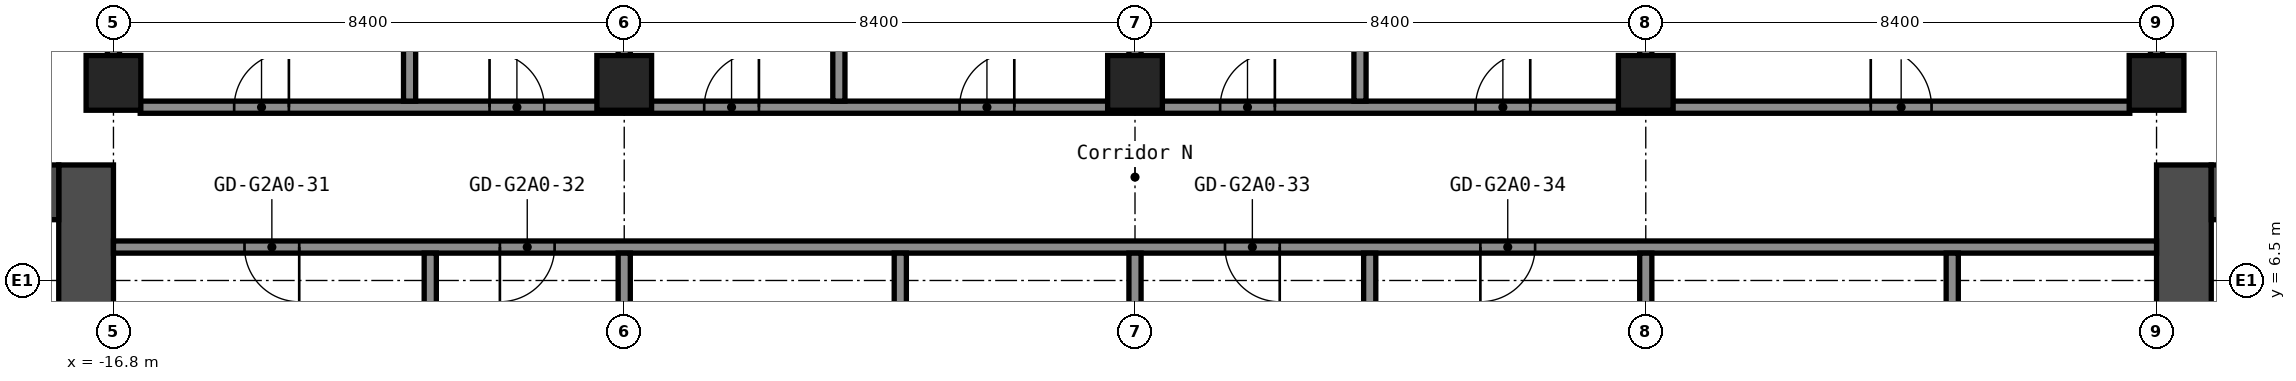
"""IFC4 building model, lengths in metres.
Left out: names, types, materials, properties, quantities, classifications, styles, units other than length and angle.
Written with IfcOpenShell. Run it as: python <this file> out.ifc"""

import sys

from ifc_helpers import new_model, si_unit, direction, frame, frame_2d, origin, origin_2d, place, context, subcontext, project, spatial, rectangle, hollow_rectangle, extrude, element, fill, save


model = new_model("IFC4")
c1 = context("Model", 3, precision=1e-05, world=origin(), true_north=direction((0.0, 1.0)))
c2 = subcontext(c1, "Body", "Model", "MODEL_VIEW")
j1 = project(units=[si_unit("LENGTHUNIT", "METRE"), si_unit("PLANEANGLEUNIT", "RADIAN")], contexts=[c1])
p1 = place(None, origin())
s1 = spatial("IfcSite", under=j1, at=p1, CompositionType="ELEMENT")
p2 = place(p1, origin())
s2 = spatial("IfcBuilding", under=s1, at=p2, CompositionType="ELEMENT")
p3 = place(p2, frame((0.0, 0.0, 75.4)))
s3 = spatial("IfcBuildingStorey", under=s2, at=p3, CompositionType="ELEMENT", Elevation=75.4)
for number, where, z_axis, x_axis in (
    (1, (-16.8, 9.75, 0.0), (0.0, 0.0, 1.0), (1.0, 0.0, 0.0)),
    (2, (-8.4, 9.75, 0.0), (0.0, 0.0, 1.0), (1.0, 0.0, 0.0)),
    (3, (0.0, 9.75, 0.0), (0.0, 0.0, 1.0), (1.0, 0.0, 0.0)),
    (4, (8.4, 9.75, 0.0), (0.0, 0.0, 1.0), (1.0, 0.0, 0.0)),
    (5, (16.8, 9.75, 0.0), (0.0, 0.0, 1.0), (1.0, 0.0, 0.0)),
):
    element("IfcColumn", number, at=place(p3, frame(where, z_axis=z_axis, x_axis=x_axis)), inside=s3, PredefinedType="COLUMN", context=c2, shape_type="SweptSolid", body=[
        extrude(hollow_rectangle(XDim=0.9, YDim=0.9, WallThickness=0.036, at=origin_2d()), origin(), (0.0, 0.0, 1.0), 2.8),
    ])
p4 = place(p3, frame((-17.25, -8.4, 0.0), z_axis=(0.0, 0.0, 1.0), x_axis=(0.0, 1.0, 0.0)))
e6 = element("IfcWall", 6, at=p4, inside=s3, PredefinedType="SHEAR", context=c2, shape_type="SweptSolid", body=[
    extrude(rectangle(XDim=16.8, YDim=0.9, at=frame_2d((8.4, 0.0))), origin(), (0.0, 0.0, 1.0), 2.8),
])
p5 = place(p4, frame((7.6, 0.0, 0.0)))
e7 = element("IfcOpeningElement", 7, at=p5, cuts=e6, PredefinedType="OPENING", context=c2, shape_type="SweptSolid", body=[
    extrude(rectangle(XDim=1.2, YDim=2.1, at=frame_2d((0.6, 1.05))), frame((0.0, 0.46, 0.0), z_axis=(0.0, -1.0, 0.0), x_axis=(1.0, 0.0, 0.0)), (0.0, 0.0, 1.0), 0.92),
])
p6 = place(p3, frame((-32.7, 7.95, 0.0), z_axis=(0.0, 0.0, 1.0), x_axis=(1.0, 0.0, 0.0)))
e8 = element("IfcWall", 8, at=p6, inside=s3, PredefinedType="SHEAR", context=c2, shape_type="SweptSolid", body=[
    extrude(rectangle(XDim=15.0, YDim=0.9, at=frame_2d((7.5, 0.0))), origin(), (0.0, 0.0, 1.0), 2.8),
])
p7 = place(p6, frame((3.4, 0.0, 0.0)))
e9 = element("IfcOpeningElement", 9, at=p7, cuts=e8, PredefinedType="OPENING", context=c2, shape_type="SweptSolid", body=[
    extrude(rectangle(XDim=1.2, YDim=2.1, at=frame_2d((0.6, 1.05))), frame((0.0, 0.46, 0.0), z_axis=(0.0, -1.0, 0.0), x_axis=(1.0, 0.0, 0.0)), (0.0, 0.0, 1.0), 0.92),
])
p8 = place(p6, frame((0.75, 0.0, 0.0)))
e10 = element("IfcOpeningElement", 10, at=p8, cuts=e8, PredefinedType="OPENING", context=c2, shape_type="SweptSolid", body=[
    extrude(rectangle(XDim=0.9, YDim=2.1, at=frame_2d((0.45, 1.05))), frame((0.0, 0.46, 0.0), z_axis=(0.0, -1.0, 0.0), x_axis=(1.0, 0.0, 0.0)), (0.0, 0.0, 1.0), 0.92),
])
p9 = place(p3, frame((17.25, -8.4, 0.0), z_axis=(0.0, 0.0, 1.0), x_axis=(0.0, 1.0, 0.0)))
e11 = element("IfcWall", 11, at=p9, inside=s3, PredefinedType="SHEAR", context=c2, shape_type="SweptSolid", body=[
    extrude(rectangle(XDim=16.8, YDim=0.9, at=frame_2d((8.4, 0.0))), origin(), (0.0, 0.0, 1.0), 2.8),
])
p10 = place(p9, frame((7.6, 0.0, 0.0)))
e12 = element("IfcOpeningElement", 12, at=p10, cuts=e11, PredefinedType="OPENING", context=c2, shape_type="SweptSolid", body=[
    extrude(rectangle(XDim=1.2, YDim=2.1, at=frame_2d((0.6, 1.05))), frame((0.0, 0.46, 0.0), z_axis=(0.0, -1.0, 0.0), x_axis=(1.0, 0.0, 0.0)), (0.0, 0.0, 1.0), 0.92),
])
p11 = place(p3, frame((17.7, 7.95, 0.0), z_axis=(0.0, 0.0, 1.0), x_axis=(1.0, 0.0, 0.0)))
e13 = element("IfcWall", 13, at=p11, inside=s3, PredefinedType="SHEAR", context=c2, shape_type="SweptSolid", body=[
    extrude(rectangle(XDim=15.0, YDim=0.9, at=frame_2d((7.5, 0.0))), origin(), (0.0, 0.0, 1.0), 2.8),
])
p12 = place(p11, frame((10.4, 0.0, 0.0)))
e14 = element("IfcOpeningElement", 14, at=p12, cuts=e13, PredefinedType="OPENING", context=c2, shape_type="SweptSolid", body=[
    extrude(rectangle(XDim=1.2, YDim=2.1, at=frame_2d((0.6, 1.05))), frame((0.0, 0.46, 0.0), z_axis=(0.0, -1.0, 0.0), x_axis=(1.0, 0.0, 0.0)), (0.0, 0.0, 1.0), 0.92),
])
p13 = place(p11, frame((13.35, 0.0, 0.0)))
e15 = element("IfcOpeningElement", 15, at=p13, cuts=e13, PredefinedType="OPENING", context=c2, shape_type="SweptSolid", body=[
    extrude(rectangle(XDim=0.9, YDim=2.1, at=frame_2d((0.45, 1.05))), frame((0.0, 0.46, 0.0), z_axis=(0.0, -1.0, 0.0), x_axis=(1.0, 0.0, 0.0)), (0.0, 0.0, 1.0), 0.92),
])
p14 = place(p3, frame((-16.8, 7.05, 0.0), z_axis=(0.0, 0.0, 1.0), x_axis=(1.0, 0.0, 0.0)))
e16 = element("IfcWall", 16, at=p14, inside=s3, PredefinedType="PARTITIONING", context=c2, shape_type="SweptSolid", body=[
    extrude(rectangle(XDim=33.6, YDim=0.2, at=frame_2d((16.8, 0.0))), origin(), (0.0, 0.0, 1.0), 2.8),
])
p15 = place(p14, frame((2.155, 0.0, 0.0)))
e17 = element("IfcOpeningElement", 17, at=p15, cuts=e16, PredefinedType="OPENING", context=c2, shape_type="SweptSolid", body=[
    extrude(rectangle(XDim=0.9, YDim=2.1, at=frame_2d((0.45, 1.05))), frame((0.0, 0.11, 0.0), z_axis=(0.0, -1.0, 0.0), x_axis=(1.0, 0.0, 0.0)), (0.0, 0.0, 1.0), 0.22),
])
p16 = place(p14, frame((6.355, 0.0, 0.0)))
e18 = element("IfcOpeningElement", 18, at=p16, cuts=e16, PredefinedType="OPENING", context=c2, shape_type="SweptSolid", body=[
    extrude(rectangle(XDim=0.9, YDim=2.1, at=frame_2d((0.45, 1.05))), frame((0.0, 0.11, 0.0), z_axis=(0.0, -1.0, 0.0), x_axis=(1.0, 0.0, 0.0)), (0.0, 0.0, 1.0), 0.22),
])
p17 = place(p14, frame((18.28, 0.0, 0.0)))
e19 = element("IfcOpeningElement", 19, at=p17, cuts=e16, PredefinedType="OPENING", context=c2, shape_type="SweptSolid", body=[
    extrude(rectangle(XDim=0.9, YDim=2.1, at=frame_2d((0.45, 1.05))), frame((0.0, 0.11, 0.0), z_axis=(0.0, -1.0, 0.0), x_axis=(1.0, 0.0, 0.0)), (0.0, 0.0, 1.0), 0.22),
])
p18 = place(p14, frame((22.48, 0.0, 0.0)))
e20 = element("IfcOpeningElement", 20, at=p18, cuts=e16, PredefinedType="OPENING", context=c2, shape_type="SweptSolid", body=[
    extrude(rectangle(XDim=0.9, YDim=2.1, at=frame_2d((0.45, 1.05))), frame((0.0, 0.11, 0.0), z_axis=(0.0, -1.0, 0.0), x_axis=(1.0, 0.0, 0.0)), (0.0, 0.0, 1.0), 0.22),
])
p19 = place(p3, frame((-16.36, 9.35, 0.0), z_axis=(0.0, 0.0, 1.0), x_axis=(1.0, 0.0, 0.0)))
e21 = element("IfcWall", 21, at=p19, inside=s3, PredefinedType="PARTITIONING", context=c2, shape_type="SweptSolid", body=[
    extrude(rectangle(XDim=32.72, YDim=0.2, at=frame_2d((16.36, 0.0))), origin(), (0.0, 0.0, 1.0), 2.8),
])
p20 = place(p19, frame((1.545, 0.0, 0.0)))
e22 = element("IfcOpeningElement", 22, at=p20, cuts=e21, PredefinedType="OPENING", context=c2, shape_type="SweptSolid", body=[
    extrude(rectangle(XDim=0.9, YDim=2.1, at=frame_2d((0.45, 1.05))), frame((0.0, 0.11, 0.0), z_axis=(0.0, -1.0, 0.0), x_axis=(1.0, 0.0, 0.0)), (0.0, 0.0, 1.0), 0.22),
])
p21 = place(p19, frame((5.745, 0.0, 0.0)))
e23 = element("IfcOpeningElement", 23, at=p21, cuts=e21, PredefinedType="OPENING", context=c2, shape_type="SweptSolid", body=[
    extrude(rectangle(XDim=0.9, YDim=2.1, at=frame_2d((0.45, 1.05))), frame((0.0, 0.11, 0.0), z_axis=(0.0, -1.0, 0.0), x_axis=(1.0, 0.0, 0.0)), (0.0, 0.0, 1.0), 0.22),
])
p22 = place(p19, frame((9.275, 0.0, 0.0)))
e24 = element("IfcOpeningElement", 24, at=p22, cuts=e21, PredefinedType="OPENING", context=c2, shape_type="SweptSolid", body=[
    extrude(rectangle(XDim=0.9, YDim=2.1, at=frame_2d((0.45, 1.05))), frame((0.0, 0.11, 0.0), z_axis=(0.0, -1.0, 0.0), x_axis=(1.0, 0.0, 0.0)), (0.0, 0.0, 1.0), 0.22),
])
p23 = place(p19, frame((13.475, 0.0, 0.0)))
e25 = element("IfcOpeningElement", 25, at=p23, cuts=e21, PredefinedType="OPENING", context=c2, shape_type="SweptSolid", body=[
    extrude(rectangle(XDim=0.9, YDim=2.1, at=frame_2d((0.45, 1.05))), frame((0.0, 0.11, 0.0), z_axis=(0.0, -1.0, 0.0), x_axis=(1.0, 0.0, 0.0)), (0.0, 0.0, 1.0), 0.22),
])
p24 = place(p19, frame((17.76, 0.0, 0.0)))
e26 = element("IfcOpeningElement", 26, at=p24, cuts=e21, PredefinedType="OPENING", context=c2, shape_type="SweptSolid", body=[
    extrude(rectangle(XDim=0.9, YDim=2.1, at=frame_2d((0.45, 1.05))), frame((0.0, 0.11, 0.0), z_axis=(0.0, -1.0, 0.0), x_axis=(1.0, 0.0, 0.0)), (0.0, 0.0, 1.0), 0.22),
])
p25 = place(p19, frame((21.96, 0.0, 0.0)))
e27 = element("IfcOpeningElement", 27, at=p25, cuts=e21, PredefinedType="OPENING", context=c2, shape_type="SweptSolid", body=[
    extrude(rectangle(XDim=0.9, YDim=2.1, at=frame_2d((0.45, 1.05))), frame((0.0, 0.11, 0.0), z_axis=(0.0, -1.0, 0.0), x_axis=(1.0, 0.0, 0.0)), (0.0, 0.0, 1.0), 0.22),
])
p26 = place(p19, frame((28.46, 0.0, 0.0)))
e28 = element("IfcOpeningElement", 28, at=p26, cuts=e21, PredefinedType="OPENING", context=c2, shape_type="SweptSolid", body=[
    extrude(rectangle(XDim=1.0, YDim=2.1, at=frame_2d((0.5, 1.05))), frame((0.0, 0.11, 0.0), z_axis=(0.0, -1.0, 0.0), x_axis=(1.0, 0.0, 0.0)), (0.0, 0.0, 1.0), 0.22),
])
p27 = place(p3, frame((-16.8, 10.19, 0.0), z_axis=(0.0, 0.0, 1.0), x_axis=(0.0, 1.0, 0.0)))
e29 = element("IfcWall", 29, at=p27, inside=s3, PredefinedType="PARTITIONING", context=c2, shape_type="SweptSolid", body=[
    extrude(rectangle(XDim=13.36, YDim=0.2, at=frame_2d((6.68, 0.0))), origin(), (0.0, 0.0, 1.0), 2.8),
])
p28 = place(p3, frame((-11.93, 9.45, 0.0), z_axis=(0.0, 0.0, 1.0), x_axis=(0.0, 1.0, 0.0)))
e30 = element("IfcWall", 30, at=p28, inside=s3, PredefinedType="PARTITIONING", context=c2, shape_type="SweptSolid", body=[
    extrude(rectangle(XDim=14.1, YDim=0.2, at=frame_2d((7.05, 0.0))), origin(), (0.0, 0.0, 1.0), 2.8),
])
for number, where, z_axis, x_axis in (
    (31, (-11.59, 1.05, 0.0), (0.0, 0.0, 1.0), (0.0, 1.0, 0.0)),
    (32, (-8.4, 1.05, 0.0), (0.0, 0.0, 1.0), (0.0, 1.0, 0.0)),
):
    element("IfcWall", number, at=place(p3, frame(where, z_axis=z_axis, x_axis=x_axis)), inside=s3, PredefinedType="PARTITIONING", context=c2, shape_type="SweptSolid", body=[
        extrude(rectangle(XDim=5.9, YDim=0.2, at=frame_2d((2.95, 0.0))), origin(), (0.0, 0.0, 1.0), 2.8),
    ])
p29 = place(p3, frame((-8.4, 10.19, 0.0), z_axis=(0.0, 0.0, 1.0), x_axis=(0.0, 1.0, 0.0)))
e33 = element("IfcWall", 33, at=p29, inside=s3, PredefinedType="PARTITIONING", context=c2, shape_type="SweptSolid", body=[
    extrude(rectangle(XDim=13.36, YDim=0.2, at=frame_2d((6.68, 0.0))), origin(), (0.0, 0.0, 1.0), 2.8),
])
p30 = place(p3, frame((-4.87, 9.45, 0.0), z_axis=(0.0, 0.0, 1.0), x_axis=(0.0, 1.0, 0.0)))
e34 = element("IfcWall", 34, at=p30, inside=s3, PredefinedType="PARTITIONING", context=c2, shape_type="SweptSolid", body=[
    extrude(rectangle(XDim=14.1, YDim=0.2, at=frame_2d((7.05, 0.0))), origin(), (0.0, 0.0, 1.0), 2.8),
])
for number, where, z_axis, x_axis in (
    (35, (-3.86, 1.05, 0.0), (0.0, 0.0, 1.0), (0.0, 1.0, 0.0)),
    (36, (0.0, 1.05, 0.0), (0.0, 0.0, 1.0), (0.0, 1.0, 0.0)),
):
    element("IfcWall", number, at=place(p3, frame(where, z_axis=z_axis, x_axis=x_axis)), inside=s3, PredefinedType="PARTITIONING", context=c2, shape_type="SweptSolid", body=[
        extrude(rectangle(XDim=5.9, YDim=0.2, at=frame_2d((2.95, 0.0))), origin(), (0.0, 0.0, 1.0), 2.8),
    ])
p31 = place(p3, frame((0.0, 10.19, 0.0), z_axis=(0.0, 0.0, 1.0), x_axis=(0.0, 1.0, 0.0)))
e37 = element("IfcWall", 37, at=p31, inside=s3, PredefinedType="PARTITIONING", context=c2, shape_type="SweptSolid", body=[
    extrude(rectangle(XDim=13.36, YDim=0.2, at=frame_2d((6.68, 0.0))), origin(), (0.0, 0.0, 1.0), 2.8),
])
p32 = place(p3, frame((3.7, 9.45, 0.0), z_axis=(0.0, 0.0, 1.0), x_axis=(0.0, 1.0, 0.0)))
e38 = element("IfcWall", 38, at=p32, inside=s3, PredefinedType="PARTITIONING", context=c2, shape_type="SweptSolid", body=[
    extrude(rectangle(XDim=14.1, YDim=0.2, at=frame_2d((7.05, 0.0))), origin(), (0.0, 0.0, 1.0), 2.8),
])
for number, where, z_axis, x_axis in (
    (39, (3.86, 1.05, 0.0), (0.0, 0.0, 1.0), (0.0, 1.0, 0.0)),
    (40, (8.4, 1.05, 0.0), (0.0, 0.0, 1.0), (0.0, 1.0, 0.0)),
):
    element("IfcWall", number, at=place(p3, frame(where, z_axis=z_axis, x_axis=x_axis)), inside=s3, PredefinedType="PARTITIONING", context=c2, shape_type="SweptSolid", body=[
        extrude(rectangle(XDim=5.9, YDim=0.2, at=frame_2d((2.95, 0.0))), origin(), (0.0, 0.0, 1.0), 2.8),
    ])
p33 = place(p3, frame((8.4, 10.19, 0.0), z_axis=(0.0, 0.0, 1.0), x_axis=(0.0, 1.0, 0.0)))
e41 = element("IfcWall", 41, at=p33, inside=s3, PredefinedType="PARTITIONING", context=c2, shape_type="SweptSolid", body=[
    extrude(rectangle(XDim=13.36, YDim=0.2, at=frame_2d((6.68, 0.0))), origin(), (0.0, 0.0, 1.0), 2.8),
])
p34 = place(p3, frame((13.44, 1.05, 0.0), z_axis=(0.0, 0.0, 1.0), x_axis=(0.0, 1.0, 0.0)))
e42 = element("IfcWall", 42, at=p34, inside=s3, PredefinedType="PARTITIONING", context=c2, shape_type="SweptSolid", body=[
    extrude(rectangle(XDim=5.9, YDim=0.2, at=frame_2d((2.95, 0.0))), origin(), (0.0, 0.0, 1.0), 2.8),
])
p35 = place(p3, frame((16.8, 10.19, 0.0), z_axis=(0.0, 0.0, 1.0), x_axis=(0.0, 1.0, 0.0)))
e43 = element("IfcWall", 43, at=p35, inside=s3, PredefinedType="PARTITIONING", context=c2, shape_type="SweptSolid", body=[
    extrude(rectangle(XDim=13.36, YDim=0.2, at=frame_2d((6.68, 0.0))), origin(), (0.0, 0.0, 1.0), 2.8),
])
p36 = place(p15, origin())
e44 = element("IfcDoor", 44, at=p36, inside=s3, OperationType="SINGLE_SWING_RIGHT", PredefinedType="DOOR", context=c2, shape_type="SweptSolid", body=[
    extrude(rectangle(XDim=0.9, YDim=2.1, at=frame_2d((0.45, 1.05))), frame((0.0, 0.025, 0.0), z_axis=(0.0, -1.0, 0.0), x_axis=(1.0, 0.0, 0.0)), (0.0, 0.0, 1.0), 0.05),
])
fill(e17, e44)
p37 = place(p16, origin())
e45 = element("IfcDoor", 45, at=p37, inside=s3, OperationType="SINGLE_SWING_LEFT", PredefinedType="DOOR", context=c2, shape_type="SweptSolid", body=[
    extrude(rectangle(XDim=0.9, YDim=2.1, at=frame_2d((0.45, 1.05))), frame((0.0, 0.025, 0.0), z_axis=(0.0, -1.0, 0.0), x_axis=(1.0, 0.0, 0.0)), (0.0, 0.0, 1.0), 0.05),
])
fill(e18, e45)
p38 = place(p17, origin())
e46 = element("IfcDoor", 46, at=p38, inside=s3, OperationType="SINGLE_SWING_RIGHT", PredefinedType="DOOR", context=c2, shape_type="SweptSolid", body=[
    extrude(rectangle(XDim=0.9, YDim=2.1, at=frame_2d((0.45, 1.05))), frame((0.0, 0.025, 0.0), z_axis=(0.0, -1.0, 0.0), x_axis=(1.0, 0.0, 0.0)), (0.0, 0.0, 1.0), 0.05),
])
fill(e19, e46)
p39 = place(p18, origin())
e47 = element("IfcDoor", 47, at=p39, inside=s3, OperationType="SINGLE_SWING_LEFT", PredefinedType="DOOR", context=c2, shape_type="SweptSolid", body=[
    extrude(rectangle(XDim=0.9, YDim=2.1, at=frame_2d((0.45, 1.05))), frame((0.0, 0.025, 0.0), z_axis=(0.0, -1.0, 0.0), x_axis=(1.0, 0.0, 0.0)), (0.0, 0.0, 1.0), 0.05),
])
fill(e20, e47)
p40 = place(p20, origin())
e48 = element("IfcDoor", 48, at=p40, inside=s3, OperationType="SINGLE_SWING_LEFT", PredefinedType="DOOR", context=c2, shape_type="SweptSolid", body=[
    extrude(rectangle(XDim=0.9, YDim=2.1, at=frame_2d((0.45, 1.05))), frame((0.0, 0.025, 0.0), z_axis=(0.0, -1.0, 0.0), x_axis=(1.0, 0.0, 0.0)), (0.0, 0.0, 1.0), 0.05),
])
fill(e22, e48)
p41 = place(p21, origin())
e49 = element("IfcDoor", 49, at=p41, inside=s3, OperationType="SINGLE_SWING_RIGHT", PredefinedType="DOOR", context=c2, shape_type="SweptSolid", body=[
    extrude(rectangle(XDim=0.9, YDim=2.1, at=frame_2d((0.45, 1.05))), frame((0.0, 0.025, 0.0), z_axis=(0.0, -1.0, 0.0), x_axis=(1.0, 0.0, 0.0)), (0.0, 0.0, 1.0), 0.05),
])
fill(e23, e49)
p42 = place(p22, origin())
e50 = element("IfcDoor", 50, at=p42, inside=s3, OperationType="SINGLE_SWING_LEFT", PredefinedType="DOOR", context=c2, shape_type="SweptSolid", body=[
    extrude(rectangle(XDim=0.9, YDim=2.1, at=frame_2d((0.45, 1.05))), frame((0.0, 0.025, 0.0), z_axis=(0.0, -1.0, 0.0), x_axis=(1.0, 0.0, 0.0)), (0.0, 0.0, 1.0), 0.05),
])
fill(e24, e50)
p43 = place(p23, origin())
e51 = element("IfcDoor", 51, at=p43, inside=s3, OperationType="SINGLE_SWING_LEFT", PredefinedType="DOOR", context=c2, shape_type="SweptSolid", body=[
    extrude(rectangle(XDim=0.9, YDim=2.1, at=frame_2d((0.45, 1.05))), frame((0.0, 0.025, 0.0), z_axis=(0.0, -1.0, 0.0), x_axis=(1.0, 0.0, 0.0)), (0.0, 0.0, 1.0), 0.05),
])
fill(e25, e51)
p44 = place(p24, origin())
e52 = element("IfcDoor", 52, at=p44, inside=s3, OperationType="SINGLE_SWING_LEFT", PredefinedType="DOOR", context=c2, shape_type="SweptSolid", body=[
    extrude(rectangle(XDim=0.9, YDim=2.1, at=frame_2d((0.45, 1.05))), frame((0.0, 0.025, 0.0), z_axis=(0.0, -1.0, 0.0), x_axis=(1.0, 0.0, 0.0)), (0.0, 0.0, 1.0), 0.05),
])
fill(e26, e52)
p45 = place(p25, origin())
e53 = element("IfcDoor", 53, at=p45, inside=s3, OperationType="SINGLE_SWING_LEFT", PredefinedType="DOOR", context=c2, shape_type="SweptSolid", body=[
    extrude(rectangle(XDim=0.9, YDim=2.1, at=frame_2d((0.45, 1.05))), frame((0.0, 0.025, 0.0), z_axis=(0.0, -1.0, 0.0), x_axis=(1.0, 0.0, 0.0)), (0.0, 0.0, 1.0), 0.05),
])
fill(e27, e53)
p46 = place(p26, origin())
e54 = element("IfcDoor", 54, at=p46, inside=s3, OperationType="SINGLE_SWING_RIGHT", PredefinedType="DOOR", context=c2, shape_type="SweptSolid", body=[
    extrude(rectangle(XDim=1.0, YDim=2.1, at=frame_2d((0.5, 1.05))), frame((0.0, 0.025, 0.0), z_axis=(0.0, -1.0, 0.0), x_axis=(1.0, 0.0, 0.0)), (0.0, 0.0, 1.0), 0.05),
])
fill(e28, e54)
save(model, sys.argv[1])
